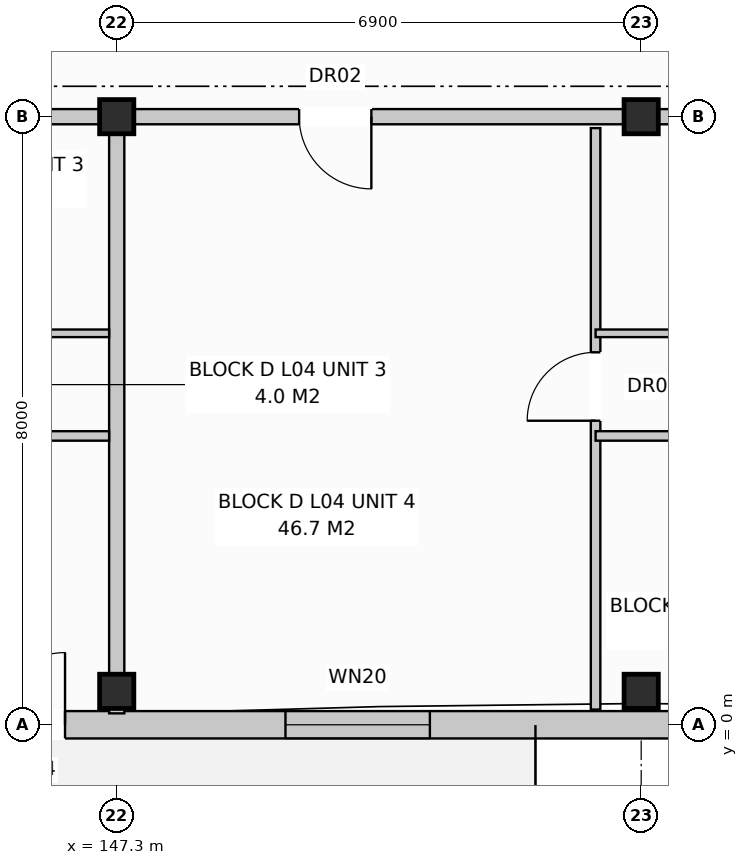
"""IFC4 building model, lengths in metres.
Left out: names, types, materials, properties, quantities, classifications, styles, units other than length and angle.
Written with IfcOpenShell. Run it as: python <this file> out.ifc"""

import sys

from ifc_helpers import new_model, si_unit, direction, frame, frame_2d, origin, origin_with_axes, origin_2d, place, context, subcontext, project, spatial, rectangle, extrude, element, fill, save


model = new_model("IFC4")
c1 = context("Model", 3, precision=1e-05, world=origin(), true_north=direction((0.0, 1.0)))
c2 = subcontext(c1, "Body", "Model", "MODEL_VIEW")
j1 = project(units=[si_unit("LENGTHUNIT", "METRE"), si_unit("PLANEANGLEUNIT", "RADIAN")], contexts=[c1])
p1 = place(None, origin())
s1 = spatial("IfcSite", under=j1, at=p1, CompositionType="ELEMENT")
p2 = place(p1, origin())
s2 = spatial("IfcBuilding", under=s1, at=p2, CompositionType="ELEMENT")
p3 = place(p2, frame((0.0, 0.0, 14.4)))
s3 = spatial("IfcBuildingStorey", under=s2, at=p3, CompositionType="ELEMENT", Elevation=14.4)
for number, where, z_axis, x_axis in (
    (1, (147.3, 0.44, 0.0), (0.0, 0.0, 1.0), (1.0, 0.0, 0.0)),
    (2, (147.3, 8.0, 0.0), (0.0, 0.0, 1.0), (1.0, 0.0, 0.0)),
    (3, (154.2, 0.44, 0.0), (0.0, 0.0, 1.0), (1.0, 0.0, 0.0)),
    (4, (154.2, 8.0, 0.0), (0.0, 0.0, 1.0), (1.0, 0.0, 0.0)),
):
    element("IfcColumn", number, at=place(p3, frame(where, z_axis=z_axis, x_axis=x_axis)), inside=s3, PredefinedType="COLUMN", context=c2, shape_type="SweptSolid", body=[
        extrude(rectangle(XDim=0.45, YDim=0.45, at=origin_2d()), origin(), (0.0, 0.0, 1.0), 3.2),
    ])
p4 = place(p3, frame((112.97, 0.0, 0.0), z_axis=(0.0, 0.0, 1.0), x_axis=(1.0, 0.0, 0.0)))
e5 = element("IfcWall", 5, at=p4, inside=s3, PredefinedType="STANDARD", context=c2, shape_type="SweptSolid", body=[
    extrude(rectangle(XDim=54.86, YDim=0.36, at=frame_2d((27.43, 0.0))), origin(), (0.0, 0.0, 1.0), 2.94),
])
p5 = place(p4, frame((5.127, 0.0, 0.0)))
e6 = element("IfcOpeningElement", 6, at=p5, cuts=e5, PredefinedType="OPENING", context=c2, shape_type="SweptSolid", body=[
    extrude(rectangle(XDim=0.95, YDim=2.1, at=frame_2d((0.475, 1.05))), frame((0.0, 0.192, 0.0), z_axis=(0.0, -1.0, 0.0), x_axis=(1.0, 0.0, 0.0)), (0.0, 0.0, 1.0), 0.384),
])
p6 = place(p4, frame((18.9, 0.0, 0.0)))
e7 = element("IfcOpeningElement", 7, at=p6, cuts=e5, PredefinedType="OPENING", context=c2, shape_type="SweptSolid", body=[
    extrude(rectangle(XDim=0.95, YDim=2.1, at=frame_2d((0.475, 1.05))), frame((0.0, 0.192, 0.0), z_axis=(0.0, -1.0, 0.0), x_axis=(1.0, 0.0, 0.0)), (0.0, 0.0, 1.0), 0.384),
])
p7 = place(p4, frame((32.7, 0.0, 0.0)))
e8 = element("IfcOpeningElement", 8, at=p7, cuts=e5, PredefinedType="OPENING", context=c2, shape_type="SweptSolid", body=[
    extrude(rectangle(XDim=0.95, YDim=2.1, at=frame_2d((0.475, 1.05))), frame((0.0, 0.192, 0.0), z_axis=(0.0, -1.0, 0.0), x_axis=(1.0, 0.0, 0.0)), (0.0, 0.0, 1.0), 0.384),
])
p8 = place(p4, frame((44.591, 0.0, 0.0)))
e9 = element("IfcOpeningElement", 9, at=p8, cuts=e5, PredefinedType="OPENING", context=c2, shape_type="SweptSolid", body=[
    extrude(rectangle(XDim=0.95, YDim=2.1, at=frame_2d((0.475, 1.05))), frame((0.0, 0.192, 0.0), z_axis=(0.0, -1.0, 0.0), x_axis=(1.0, 0.0, 0.0)), (0.0, 0.0, 1.0), 0.384),
])
p9 = place(p4, frame((0.9, 0.0, 0.8)))
e10 = element("IfcOpeningElement", 10, at=p9, cuts=e5, PredefinedType="OPENING", context=c2, shape_type="SweptSolid", body=[
    extrude(rectangle(XDim=1.8, YDim=1.7, at=frame_2d((0.9, 0.85))), frame((0.0, 0.192, 0.0), z_axis=(0.0, -1.0, 0.0), x_axis=(1.0, 0.0, 0.0)), (0.0, 0.0, 1.0), 0.384),
])
p10 = place(p4, frame((8.35, 0.0, 0.72)))
e11 = element("IfcOpeningElement", 11, at=p10, cuts=e5, PredefinedType="OPENING", context=c2, shape_type="SweptSolid", body=[
    extrude(rectangle(XDim=1.1, YDim=1.5, at=frame_2d((0.55, 0.75))), frame((0.0, 0.192, 0.0), z_axis=(0.0, -1.0, 0.0), x_axis=(1.0, 0.0, 0.0)), (0.0, 0.0, 1.0), 0.384),
])
p11 = place(p4, frame((11.225, 0.0, 0.8)))
e12 = element("IfcOpeningElement", 12, at=p11, cuts=e5, PredefinedType="OPENING", context=c2, shape_type="SweptSolid", body=[
    extrude(rectangle(XDim=1.95, YDim=1.65, at=frame_2d((0.975, 0.825))), frame((0.0, 0.192, 0.0), z_axis=(0.0, -1.0, 0.0), x_axis=(1.0, 0.0, 0.0)), (0.0, 0.0, 1.0), 0.384),
])
p12 = place(p4, frame((16.8, 0.0, 0.8)))
e13 = element("IfcOpeningElement", 13, at=p12, cuts=e5, PredefinedType="OPENING", context=c2, shape_type="SweptSolid", body=[
    extrude(rectangle(XDim=1.8, YDim=1.7, at=frame_2d((0.9, 0.85))), frame((0.0, 0.192, 0.0), z_axis=(0.0, -1.0, 0.0), x_axis=(1.0, 0.0, 0.0)), (0.0, 0.0, 1.0), 0.384),
])
p13 = place(p4, frame((22.25, 0.0, 0.72)))
e14 = element("IfcOpeningElement", 14, at=p13, cuts=e5, PredefinedType="OPENING", context=c2, shape_type="SweptSolid", body=[
    extrude(rectangle(XDim=1.9, YDim=1.85, at=frame_2d((0.95, 0.925))), frame((0.0, 0.192, 0.0), z_axis=(0.0, -1.0, 0.0), x_axis=(1.0, 0.0, 0.0)), (0.0, 0.0, 1.0), 0.384),
])
p14 = place(p4, frame((28.35, 0.0, 0.72)))
e15 = element("IfcOpeningElement", 15, at=p14, cuts=e5, PredefinedType="OPENING", context=c2, shape_type="SweptSolid", body=[
    extrude(rectangle(XDim=1.1, YDim=1.5, at=frame_2d((0.55, 0.75))), frame((0.0, 0.192, 0.0), z_axis=(0.0, -1.0, 0.0), x_axis=(1.0, 0.0, 0.0)), (0.0, 0.0, 1.0), 0.384),
])
p15 = place(p4, frame((30.6, 0.0, 0.8)))
e16 = element("IfcOpeningElement", 16, at=p15, cuts=e5, PredefinedType="OPENING", context=c2, shape_type="SweptSolid", body=[
    extrude(rectangle(XDim=1.8, YDim=1.7, at=frame_2d((0.9, 0.85))), frame((0.0, 0.192, 0.0), z_axis=(0.0, -1.0, 0.0), x_axis=(1.0, 0.0, 0.0)), (0.0, 0.0, 1.0), 0.384),
])
p16 = place(p4, frame((36.55, 0.0, 0.8)))
e17 = element("IfcOpeningElement", 17, at=p16, cuts=e5, PredefinedType="OPENING", context=c2, shape_type="SweptSolid", body=[
    extrude(rectangle(XDim=1.9, YDim=1.85, at=frame_2d((0.95, 0.925))), frame((0.0, 0.192, 0.0), z_axis=(0.0, -1.0, 0.0), x_axis=(1.0, 0.0, 0.0)), (0.0, 0.0, 1.0), 0.384),
])
p17 = place(p4, frame((42.65, 0.0, 0.72)))
e18 = element("IfcOpeningElement", 18, at=p17, cuts=e5, PredefinedType="OPENING", context=c2, shape_type="SweptSolid", body=[
    extrude(rectangle(XDim=1.1, YDim=1.5, at=frame_2d((0.55, 0.75))), frame((0.0, 0.192, 0.0), z_axis=(0.0, -1.0, 0.0), x_axis=(1.0, 0.0, 0.0)), (0.0, 0.0, 1.0), 0.384),
])
p18 = place(p4, frame((48.7, 0.0, 0.8)))
e19 = element("IfcOpeningElement", 19, at=p18, cuts=e5, PredefinedType="OPENING", context=c2, shape_type="SweptSolid", body=[
    extrude(rectangle(XDim=1.8, YDim=1.7, at=frame_2d((0.9, 0.85))), frame((0.0, 0.192, 0.0), z_axis=(0.0, -1.0, 0.0), x_axis=(1.0, 0.0, 0.0)), (0.0, 0.0, 1.0), 0.384),
])
p19 = place(p4, frame((52.45, 0.0, 0.72)))
e20 = element("IfcOpeningElement", 20, at=p19, cuts=e5, PredefinedType="OPENING", context=c2, shape_type="SweptSolid", body=[
    extrude(rectangle(XDim=1.1, YDim=1.5, at=frame_2d((0.55, 0.75))), frame((0.0, 0.192, 0.0), z_axis=(0.0, -1.0, 0.0), x_axis=(1.0, 0.0, 0.0)), (0.0, 0.0, 1.0), 0.384),
])
p20 = place(p3, frame((147.3, 7.85, 0.0), z_axis=(0.0, 0.0, 1.0), x_axis=(0.0, -1.0, 0.0)))
e21 = element("IfcWall", 21, at=p20, inside=s3, PredefinedType="PARTITIONING", context=c2, shape_type="SweptSolid", body=[
    extrude(rectangle(XDim=7.7, YDim=0.2, at=frame_2d((3.85, 0.0))), origin(), (0.0, 0.0, 1.0), 2.94),
])
p21 = place(p3, frame((133.5, 8.0, 0.0), z_axis=(0.0, 0.0, 1.0), x_axis=(1.0, 0.0, 0.0)))
e22 = element("IfcWall", 22, at=p21, inside=s3, PredefinedType="PARTITIONING", context=c2, shape_type="SweptSolid", body=[
    extrude(rectangle(XDim=13.8, YDim=0.2, at=frame_2d((6.9, 0.0))), origin(), (0.0, 0.0, 1.0), 2.38),
])
p22 = place(p21, frame((2.4, 0.0, 0.0)))
e23 = element("IfcOpeningElement", 23, at=p22, cuts=e22, PredefinedType="OPENING", context=c2, shape_type="SweptSolid", body=[
    extrude(rectangle(XDim=0.95, YDim=2.15, at=frame_2d((0.475, 1.075))), frame((0.0, 0.112, 0.0), z_axis=(0.0, -1.0, 0.0), x_axis=(1.0, 0.0, 0.0)), (0.0, 0.0, 1.0), 0.224),
])
p23 = place(p3, frame((138.7, 5.15, 0.0), z_axis=(0.0, 0.0, 1.0), x_axis=(1.0, 0.0, 0.0)))
e24 = element("IfcWall", 24, at=p23, inside=s3, PredefinedType="PARTITIONING", context=c2, shape_type="SweptSolid", body=[
    extrude(rectangle(XDim=8.5, YDim=0.1, at=frame_2d((4.25, 0.0))), origin(), (0.0, 0.0, 1.0), 2.94),
])
p24 = place(p23, frame((1.0, 0.0, 0.0)))
e25 = element("IfcOpeningElement", 25, at=p24, cuts=e24, PredefinedType="OPENING", context=c2, shape_type="SweptSolid", body=[
    extrude(rectangle(XDim=0.85, YDim=2.1, at=frame_2d((0.425, 1.05))), frame((0.0, 0.062, 0.0), z_axis=(0.0, -1.0, 0.0), x_axis=(1.0, 0.0, 0.0)), (0.0, 0.0, 1.0), 0.124),
])
p25 = place(p23, frame((3.4, 0.0, 0.0)))
e26 = element("IfcOpeningElement", 26, at=p25, cuts=e24, PredefinedType="OPENING", context=c2, shape_type="SweptSolid", body=[
    extrude(rectangle(XDim=0.85, YDim=2.05, at=frame_2d((0.425, 1.025))), frame((0.0, 0.062, 0.0), z_axis=(0.0, -1.0, 0.0), x_axis=(1.0, 0.0, 0.0)), (0.0, 0.0, 1.0), 0.124),
])
p26 = place(p23, frame((6.2, 0.0, 0.0)))
e27 = element("IfcOpeningElement", 27, at=p26, cuts=e24, PredefinedType="OPENING", context=c2, shape_type="SweptSolid", body=[
    extrude(rectangle(XDim=0.85, YDim=2.05, at=frame_2d((0.425, 1.025))), frame((0.0, 0.062, 0.0), z_axis=(0.0, -1.0, 0.0), x_axis=(1.0, 0.0, 0.0)), (0.0, 0.0, 1.0), 0.124),
])
p27 = place(p3, frame((138.7, 3.8, 0.0), z_axis=(0.0, 0.0, 1.0), x_axis=(1.0, 0.0, 0.0)))
e28 = element("IfcWall", 28, at=p27, inside=s3, PredefinedType="PARTITIONING", context=c2, shape_type="SweptSolid", body=[
    extrude(rectangle(XDim=8.5, YDim=0.125, at=frame_2d((4.25, 0.0))), origin(), (0.0, 0.0, 1.0), 2.94),
])
p28 = place(p27, frame((1.5, 0.0, 0.0)))
e29 = element("IfcOpeningElement", 29, at=p28, cuts=e28, PredefinedType="OPENING", context=c2, shape_type="SweptSolid", body=[
    extrude(rectangle(XDim=0.9, YDim=2.1, at=frame_2d((0.45, 1.05))), frame((0.0, 0.074, 0.0), z_axis=(0.0, -1.0, 0.0), x_axis=(1.0, 0.0, 0.0)), (0.0, 0.0, 1.0), 0.149),
])
p29 = place(p27, frame((5.6, 0.0, 0.0)))
e30 = element("IfcOpeningElement", 30, at=p29, cuts=e28, PredefinedType="OPENING", context=c2, shape_type="SweptSolid", body=[
    extrude(rectangle(XDim=0.9, YDim=2.1, at=frame_2d((0.45, 1.05))), frame((0.0, 0.074, 0.0), z_axis=(0.0, -1.0, 0.0), x_axis=(1.0, 0.0, 0.0)), (0.0, 0.0, 1.0), 0.149),
])
p30 = place(p3, frame((147.3, 8.0, 0.0), z_axis=(0.0, 0.0, 1.0), x_axis=(1.0, 0.0, 0.0)))
e31 = element("IfcWall", 31, at=p30, inside=s3, PredefinedType="PARTITIONING", context=c2, shape_type="SweptSolid", body=[
    extrude(rectangle(XDim=20.7, YDim=0.2, at=frame_2d((10.35, 0.0))), origin(), (0.0, 0.0, 1.0), 2.38),
])
p31 = place(p30, frame((2.4, 0.0, 0.0)))
e32 = element("IfcOpeningElement", 32, at=p31, cuts=e31, PredefinedType="OPENING", context=c2, shape_type="SweptSolid", body=[
    extrude(rectangle(XDim=0.95, YDim=2.15, at=frame_2d((0.475, 1.075))), frame((0.0, 0.112, 0.0), z_axis=(0.0, -1.0, 0.0), x_axis=(1.0, 0.0, 0.0)), (0.0, 0.0, 1.0), 0.224),
])
p32 = place(p3, frame((153.6, 7.85, 0.0), z_axis=(0.0, 0.0, 1.0), x_axis=(0.0, -1.0, 0.0)))
e33 = element("IfcWall", 33, at=p32, inside=s3, PredefinedType="PARTITIONING", context=c2, shape_type="SweptSolid", body=[
    extrude(rectangle(XDim=7.65, YDim=0.125, at=frame_2d((3.825, 0.0))), origin(), (0.0, 0.0, 1.0), 2.94),
])
p33 = place(p32, frame((2.95, 0.0, 0.0)))
e34 = element("IfcOpeningElement", 34, at=p33, cuts=e33, PredefinedType="OPENING", context=c2, shape_type="SweptSolid", body=[
    extrude(rectangle(XDim=0.9, YDim=2.1, at=frame_2d((0.45, 1.05))), frame((0.0, 0.074, 0.0), z_axis=(0.0, -1.0, 0.0), x_axis=(1.0, 0.0, 0.0)), (0.0, 0.0, 1.0), 0.149),
])
p34 = place(p3, frame((153.6, 5.15, 0.0), z_axis=(0.0, 0.0, 1.0), x_axis=(1.0, 0.0, 0.0)))
e35 = element("IfcWall", 35, at=p34, inside=s3, PredefinedType="PARTITIONING", context=c2, shape_type="SweptSolid", body=[
    extrude(rectangle(XDim=14.3, YDim=0.1, at=frame_2d((7.15, 0.0))), origin(), (0.0, 0.0, 1.0), 2.94),
])
p35 = place(p34, frame((1.6, 0.0, 0.0)))
e36 = element("IfcOpeningElement", 36, at=p35, cuts=e35, PredefinedType="OPENING", context=c2, shape_type="SweptSolid", body=[
    extrude(rectangle(XDim=0.9, YDim=2.1, at=frame_2d((0.45, 1.05))), frame((0.0, 0.062, 0.0), z_axis=(0.0, -1.0, 0.0), x_axis=(1.0, 0.0, 0.0)), (0.0, 0.0, 1.0), 0.124),
])
p36 = place(p34, frame((5.1, 0.0, 0.0)))
e37 = element("IfcOpeningElement", 37, at=p36, cuts=e35, PredefinedType="OPENING", context=c2, shape_type="SweptSolid", body=[
    extrude(rectangle(XDim=0.85, YDim=2.05, at=frame_2d((0.425, 1.025))), frame((0.0, 0.062, 0.0), z_axis=(0.0, -1.0, 0.0), x_axis=(1.0, 0.0, 0.0)), (0.0, 0.0, 1.0), 0.124),
])
p37 = place(p34, frame((8.2, 0.0, 0.0)))
e38 = element("IfcOpeningElement", 38, at=p37, cuts=e35, PredefinedType="OPENING", context=c2, shape_type="SweptSolid", body=[
    extrude(rectangle(XDim=0.85, YDim=2.05, at=frame_2d((0.425, 1.025))), frame((0.0, 0.062, 0.0), z_axis=(0.0, -1.0, 0.0), x_axis=(1.0, 0.0, 0.0)), (0.0, 0.0, 1.0), 0.124),
])
p38 = place(p34, frame((11.6, 0.0, 0.0)))
e39 = element("IfcOpeningElement", 39, at=p38, cuts=e35, PredefinedType="OPENING", context=c2, shape_type="SweptSolid", body=[
    extrude(rectangle(XDim=0.85, YDim=2.05, at=frame_2d((0.425, 1.025))), frame((0.0, 0.062, 0.0), z_axis=(0.0, -1.0, 0.0), x_axis=(1.0, 0.0, 0.0)), (0.0, 0.0, 1.0), 0.124),
])
p39 = place(p3, frame((153.6, 3.8, 0.0), z_axis=(0.0, 0.0, 1.0), x_axis=(1.0, 0.0, 0.0)))
e40 = element("IfcWall", 40, at=p39, inside=s3, PredefinedType="PARTITIONING", context=c2, shape_type="SweptSolid", body=[
    extrude(rectangle(XDim=10.4, YDim=0.125, at=frame_2d((5.2, 0.0))), origin(), (0.0, 0.0, 1.0), 2.94),
])
p40 = place(p39, frame((2.0, 0.0, 0.0)))
e41 = element("IfcOpeningElement", 41, at=p40, cuts=e40, PredefinedType="OPENING", context=c2, shape_type="SweptSolid", body=[
    extrude(rectangle(XDim=0.9, YDim=2.1, at=frame_2d((0.45, 1.05))), frame((0.0, 0.074, 0.0), z_axis=(0.0, -1.0, 0.0), x_axis=(1.0, 0.0, 0.0)), (0.0, 0.0, 1.0), 0.149),
])
p41 = place(p39, frame((7.2, 0.0, 0.0)))
e42 = element("IfcOpeningElement", 42, at=p41, cuts=e40, PredefinedType="OPENING", context=c2, shape_type="SweptSolid", body=[
    extrude(rectangle(XDim=0.9, YDim=2.1, at=frame_2d((0.45, 1.05))), frame((0.0, 0.074, 0.0), z_axis=(0.0, -1.0, 0.0), x_axis=(1.0, 0.0, 0.0)), (0.0, 0.0, 1.0), 0.149),
])
p42 = place(p7, origin_with_axes())
e43 = element("IfcDoor", 43, at=p42, inside=s3, OperationType="SINGLE_SWING_RIGHT", PredefinedType="DOOR", context=c2, shape_type="SweptSolid", body=[
    extrude(rectangle(XDim=0.95, YDim=2.1, at=frame_2d((0.475, 1.05))), frame((0.0, 0.025, 0.0), z_axis=(0.0, -1.0, 0.0), x_axis=(1.0, 0.0, 0.0)), (0.0, 0.0, 1.0), 0.05),
])
fill(e8, e43)
p43 = place(p16, origin_with_axes())
e44 = element("IfcWindow", 44, at=p43, inside=s3, PartitioningType="SINGLE_PANEL", PredefinedType="WINDOW", context=c2, shape_type="SweptSolid", body=[
    extrude(rectangle(XDim=1.9, YDim=1.85, at=frame_2d((0.95, 0.925))), frame((0.0, 0.03, 0.0), z_axis=(0.0, -1.0, 0.0), x_axis=(1.0, 0.0, 0.0)), (0.0, 0.0, 1.0), 0.06),
])
fill(e17, e44)
p44 = place(p31, frame((0.95, 0.0, 0.0), z_axis=(0.0, 0.0, 1.0), x_axis=(-1.0, 0.0, 0.0)))
e45 = element("IfcDoor", 45, at=p44, inside=s3, OperationType="SINGLE_SWING_RIGHT", PredefinedType="DOOR", context=c2, shape_type="SweptSolid", body=[
    extrude(rectangle(XDim=0.95, YDim=2.15, at=frame_2d((0.475, 1.075))), frame((0.0, 0.025, 0.0), z_axis=(0.0, -1.0, 0.0), x_axis=(1.0, 0.0, 0.0)), (0.0, 0.0, 1.0), 0.05),
])
fill(e32, e45)
p45 = place(p33, frame((0.9, 0.0, 0.0), z_axis=(0.0, 0.0, 1.0), x_axis=(-1.0, 0.0, 0.0)))
e46 = element("IfcDoor", 46, at=p45, inside=s3, OperationType="SINGLE_SWING_RIGHT", PredefinedType="DOOR", context=c2, shape_type="SweptSolid", body=[
    extrude(rectangle(XDim=0.9, YDim=2.1, at=frame_2d((0.45, 1.05))), frame((0.0, 0.025, 0.0), z_axis=(0.0, -1.0, 0.0), x_axis=(1.0, 0.0, 0.0)), (0.0, 0.0, 1.0), 0.05),
])
fill(e34, e46)
save(model, sys.argv[1])
